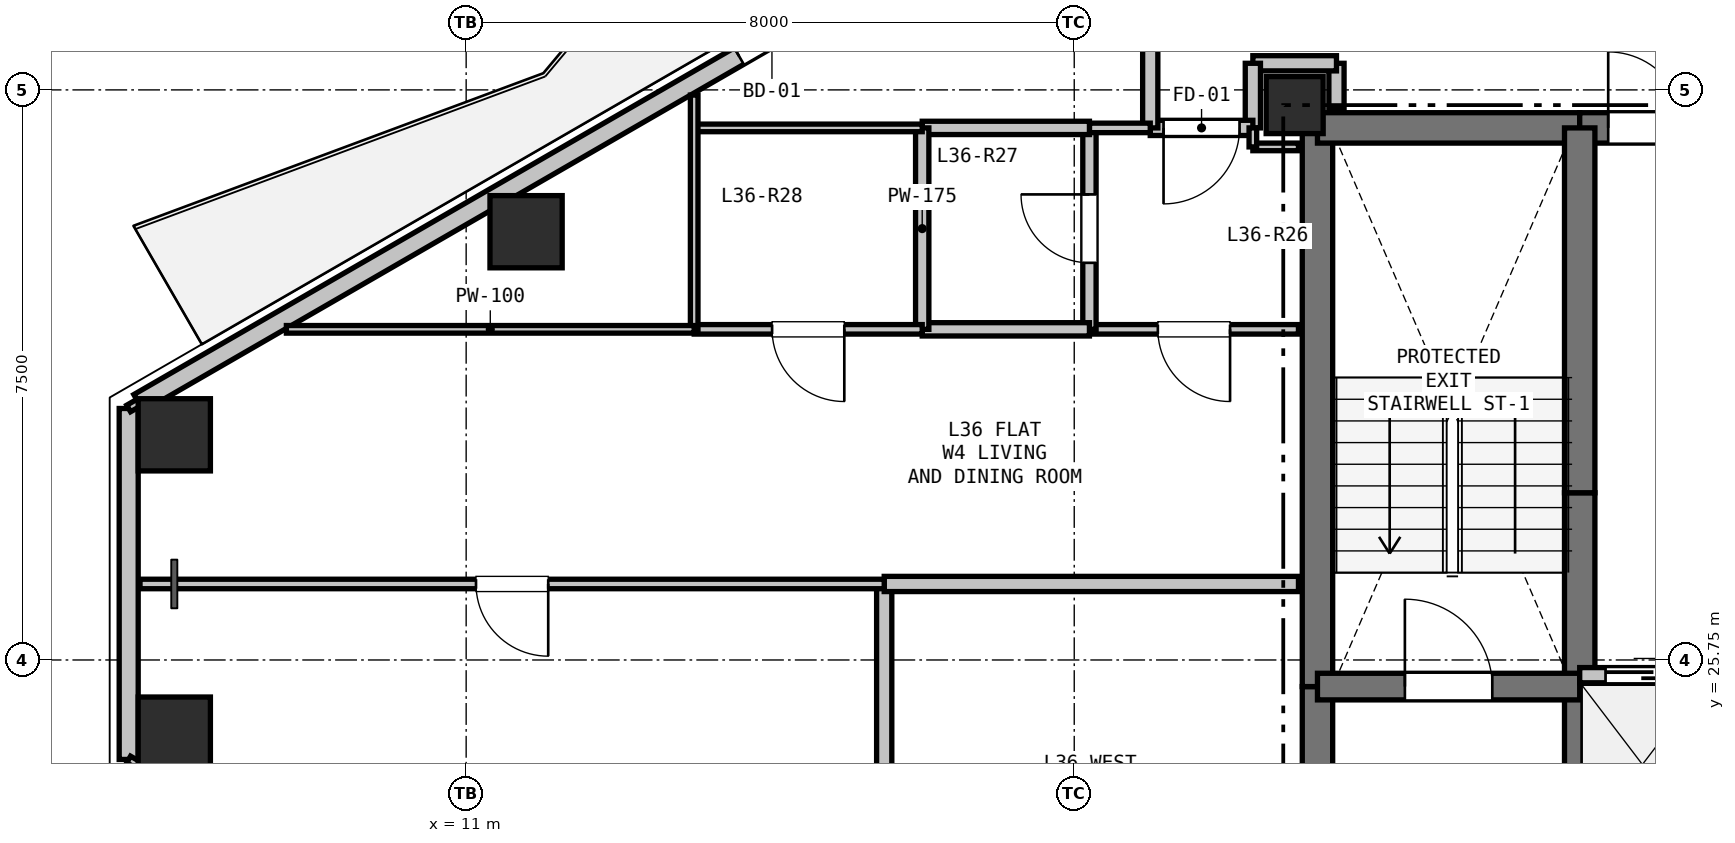
"""IFC4 building model, lengths in metres.
Left out: names, types, materials, properties, quantities, classifications, styles, units other than length and angle.
Written with IfcOpenShell. Run it as: python <this file> out.ifc"""

import sys

from ifc_helpers import new_model, si_unit, direction, frame, frame_2d, origin, origin_2d, place, context, subcontext, project, spatial, rectangle, hollow_rectangle, extrude, element, fill, save


model = new_model("IFC4")
c1 = context("Model", 3, precision=1e-05, world=origin(), true_north=direction((0.0, 1.0)))
c2 = subcontext(c1, "Body", "Model", "MODEL_VIEW")
j1 = project(units=[si_unit("LENGTHUNIT", "METRE"), si_unit("PLANEANGLEUNIT", "RADIAN")], contexts=[c1])
p1 = place(None, origin())
s1 = spatial("IfcSite", under=j1, at=p1, CompositionType="ELEMENT")
p2 = place(p1, origin())
s2 = spatial("IfcBuilding", under=s1, at=p2, CompositionType="ELEMENT")
p3 = place(p2, frame((0.0, 0.0, 131.1)))
s3 = spatial("IfcBuildingStorey", under=s2, at=p3, CompositionType="ELEMENT", Elevation=131.1)
p4 = place(p3, frame((21.9, 33.05, 0.0), z_axis=(0.0, 0.0, 1.0), x_axis=(1.0, 0.0, 0.0)))
e1 = element("IfcColumn", 1, at=p4, inside=s3, PredefinedType="COLUMN", context=c2, shape_type="SweptSolid", body=[
    extrude(rectangle(XDim=0.75, YDim=0.75, at=origin_2d()), origin(), (0.0, 0.0, 1.0), 3.3),
])
for number, where, z_axis, x_axis in (
    (2, (7.16, 28.712, 0.0), (0.0, 0.0, 1.0), (1.0, 0.0, 0.0)),
    (3, (11.788, 31.384, 0.0), (0.0, 0.0, 1.0), (1.0, 0.0, 0.0)),
    (4, (7.16, 24.788, 0.0), (0.0, 0.0, 1.0), (1.0, 0.0, 0.0)),
):
    element("IfcColumn", number, at=place(p3, frame(where, z_axis=z_axis, x_axis=x_axis)), inside=s3, PredefinedType="COLUMN", context=c2, shape_type="SweptSolid", body=[
        extrude(hollow_rectangle(XDim=0.95, YDim=0.95, WallThickness=0.028, at=origin_2d()), origin(), (0.0, 0.0, 1.0), 3.3),
    ])
p5 = place(p3, frame((6.56, 24.441, 0.0), z_axis=(0.0, 0.0, 1.0), x_axis=(0.0, 1.0, 0.0)))
e5 = element("IfcWall", 5, at=p5, inside=s3, PredefinedType="SOLIDWALL", context=c2, shape_type="SweptSolid", body=[
    extrude(rectangle(XDim=4.617, YDim=0.25, at=frame_2d((2.309, 0.0))), origin(), (0.0, 0.0, 1.0), 2.68),
])
p6 = place(p3, frame((6.69, 29.134, 0.0), z_axis=(0.0, 0.0, 1.0), x_axis=(0.866027848477, 0.499995765644, 0.0)))
e6 = element("IfcWall", 6, at=p6, inside=s3, PredefinedType="SOLIDWALL", context=c2, shape_type="SweptSolid", body=[
    extrude(rectangle(XDim=11.186, YDim=0.25, at=frame_2d((5.593, 0.0))), origin(), (0.0, 0.0, 1.0), 2.68),
])
p7 = place(p6, frame((9.122, 0.0, 0.0)))
e7 = element("IfcOpeningElement", 7, at=p7, cuts=e6, PredefinedType="OPENING", context=c2, shape_type="SweptSolid", body=[
    extrude(rectangle(XDim=1.0, YDim=2.1, at=frame_2d((0.5, 1.05))), frame((0.0, 0.135, 0.0), z_axis=(0.0, -1.0, 0.0), x_axis=(1.0, 0.0, 0.0)), (0.0, 0.0, 1.0), 0.27),
])
p8 = place(p3, frame((16.378, 18.773, 0.0), z_axis=(0.0, 0.0, 1.0), x_axis=(-0.866027848477, 0.499995765644, 0.0)))
e8 = element("IfcWall", 8, at=p8, inside=s3, PredefinedType="SOLIDWALL", context=c2, shape_type="SweptSolid", body=[
    extrude(rectangle(XDim=11.186, YDim=0.25, at=frame_2d((5.593, 0.0))), origin(), (0.0, 0.0, 1.0), 2.68),
])
p9 = place(p8, frame((6.605, 0.0, 0.9)))
e9 = element("IfcOpeningElement", 9, at=p9, cuts=e8, PredefinedType="OPENING", context=c2, shape_type="SweptSolid", body=[
    extrude(rectangle(XDim=1.2, YDim=1.4, at=frame_2d((0.6, 0.7))), frame((0.0, 0.135, 0.0), z_axis=(0.0, -1.0, 0.0), x_axis=(1.0, 0.0, 0.0)), (0.0, 0.0, 1.0), 0.27),
])
p10 = place(p3, frame((22.2, 20.75, 0.0), z_axis=(0.0, 0.0, 1.0), x_axis=(0.0, 1.0, 0.0)))
e10 = element("IfcWall", 10, at=p10, inside=s3, PredefinedType="SHEAR", context=c2, shape_type="SweptSolid", body=[
    extrude(rectangle(XDim=4.65, YDim=0.4, at=frame_2d((2.325, 0.0))), origin(), (0.0, 0.0, 1.0), 3.06),
])
p11 = place(p3, frame((22.2, 25.4, 0.0), z_axis=(0.0, 0.0, 1.0), x_axis=(0.0, 1.0, 0.0)))
e11 = element("IfcWall", 11, at=p11, inside=s3, PredefinedType="SHEAR", context=c2, shape_type="SweptSolid", body=[
    extrude(rectangle(XDim=7.35, YDim=0.4, at=frame_2d((3.675, 0.0))), origin(), (0.0, 0.0, 1.0), 3.06),
])
p12 = place(p3, frame((22.2, 32.75, 0.0), z_axis=(0.0, 0.0, 1.0), x_axis=(1.0, 0.0, 0.0)))
e12 = element("IfcWall", 12, at=p12, inside=s3, PredefinedType="SHEAR", context=c2, shape_type="SweptSolid", body=[
    extrude(rectangle(XDim=3.45, YDim=0.4, at=frame_2d((1.725, 0.0))), origin(), (0.0, 0.0, 1.0), 3.06),
])
p13 = place(p3, frame((25.65, 32.75, 0.0), z_axis=(0.0, 0.0, 1.0), x_axis=(1.0, 0.0, 0.0)))
e13 = element("IfcWall", 13, at=p13, inside=s3, PredefinedType="SHEAR", context=c2, shape_type="SweptSolid", body=[
    extrude(rectangle(XDim=1.75, YDim=0.4, at=frame_2d((0.875, 0.0))), origin(), (0.0, 0.0, 1.0), 3.06),
])
p14 = place(p13, frame((0.375, 0.0, 0.0)))
e14 = element("IfcOpeningElement", 14, at=p14, cuts=e13, PredefinedType="OPENING", context=c2, shape_type="SweptSolid", body=[
    extrude(rectangle(XDim=1.0, YDim=2.15, at=frame_2d((0.5, 1.075))), frame((0.0, 0.21, 0.0), z_axis=(0.0, -1.0, 0.0), x_axis=(1.0, 0.0, 0.0)), (0.0, 0.0, 1.0), 0.42),
])
p15 = place(p3, frame((25.65, 22.75, 0.0), z_axis=(0.0, 0.0, 1.0), x_axis=(0.0, 1.0, 0.0)))
e15 = element("IfcWall", 15, at=p15, inside=s3, PredefinedType="SHEAR", context=c2, shape_type="SweptSolid", body=[
    extrude(rectangle(XDim=2.8, YDim=0.4, at=frame_2d((1.4, 0.0))), origin(), (0.0, 0.0, 1.0), 3.06),
])
p16 = place(p3, frame((25.65, 25.55, 0.0), z_axis=(0.0, 0.0, 1.0), x_axis=(0.0, 1.0, 0.0)))
e16 = element("IfcWall", 16, at=p16, inside=s3, PredefinedType="SHEAR", context=c2, shape_type="SweptSolid", body=[
    extrude(rectangle(XDim=2.4, YDim=0.4, at=frame_2d((1.2, 0.0))), origin(), (0.0, 0.0, 1.0), 3.06),
])
p17 = place(p3, frame((25.65, 27.95, 0.0), z_axis=(0.0, 0.0, 1.0), x_axis=(0.0, 1.0, 0.0)))
e17 = element("IfcWall", 17, at=p17, inside=s3, PredefinedType="SHEAR", context=c2, shape_type="SweptSolid", body=[
    extrude(rectangle(XDim=4.8, YDim=0.4, at=frame_2d((2.4, 0.0))), origin(), (0.0, 0.0, 1.0), 3.06),
])
p18 = place(p3, frame((22.2, 25.4, 0.0), z_axis=(0.0, 0.0, 1.0), x_axis=(1.0, 0.0, 0.0)))
e18 = element("IfcWall", 18, at=p18, inside=s3, PredefinedType="SHEAR", context=c2, shape_type="SweptSolid", body=[
    extrude(rectangle(XDim=3.45, YDim=0.35, at=frame_2d((1.725, 0.0))), origin(), (0.0, 0.0, 1.0), 3.06),
])
p19 = place(p18, frame((1.15, 0.0, 0.0)))
e19 = element("IfcOpeningElement", 19, at=p19, cuts=e18, PredefinedType="OPENING", context=c2, shape_type="SweptSolid", body=[
    extrude(rectangle(XDim=1.15, YDim=2.15, at=frame_2d((0.575, 1.075))), frame((0.0, 0.185, 0.0), z_axis=(0.0, -1.0, 0.0), x_axis=(1.0, 0.0, 0.0)), (0.0, 0.0, 1.0), 0.37),
])
p20 = place(p3, frame((25.65, 25.55, 0.0), z_axis=(0.0, 0.0, 1.0), x_axis=(1.0, 0.0, 0.0)))
e20 = element("IfcWall", 20, at=p20, inside=s3, PredefinedType="PARTITIONING", context=c2, shape_type="SweptSolid", body=[
    extrude(rectangle(XDim=4.95, YDim=0.2, at=frame_2d((2.475, 0.0))), origin(), (0.0, 0.0, 1.0), 3.06),
])
p21 = place(p20, frame((0.34, 0.0, 0.0)))
e21 = element("IfcOpeningElement", 21, at=p21, cuts=e20, PredefinedType="OPENING", context=c2, shape_type="SweptSolid", body=[
    extrude(rectangle(XDim=1.1, YDim=2.15, at=frame_2d((0.55, 1.075))), frame((0.0, 0.11, 0.0), z_axis=(0.0, -1.0, 0.0), x_axis=(1.0, 0.0, 0.0)), (0.0, 0.0, 1.0), 0.22),
])
p22 = place(p20, frame((1.99, 0.0, 0.0)))
e22 = element("IfcOpeningElement", 22, at=p22, cuts=e20, PredefinedType="OPENING", context=c2, shape_type="SweptSolid", body=[
    extrude(rectangle(XDim=1.1, YDim=2.15, at=frame_2d((0.55, 1.075))), frame((0.0, 0.11, 0.0), z_axis=(0.0, -1.0, 0.0), x_axis=(1.0, 0.0, 0.0)), (0.0, 0.0, 1.0), 0.22),
])
p23 = place(p20, frame((3.64, 0.0, 0.0)))
e23 = element("IfcOpeningElement", 23, at=p23, cuts=e20, PredefinedType="OPENING", context=c2, shape_type="SweptSolid", body=[
    extrude(rectangle(XDim=1.1, YDim=2.15, at=frame_2d((0.55, 1.075))), frame((0.0, 0.11, 0.0), z_axis=(0.0, -1.0, 0.0), x_axis=(1.0, 0.0, 0.0)), (0.0, 0.0, 1.0), 0.22),
])
p24 = place(p3, frame((22.45, 33.0, 0.0), z_axis=(0.0, 0.0, 1.0), x_axis=(0.0, 1.0, 0.0)))
e24 = element("IfcWall", 24, at=p24, inside=s3, PredefinedType="PARTITIONING", context=c2, shape_type="SweptSolid", body=[
    extrude(rectangle(XDim=0.6, YDim=0.2, at=frame_2d((0.3, 0.0))), origin(), (0.0, 0.0, 1.0), 2.508),
])
p25 = place(p3, frame((22.45, 33.6, 0.0), z_axis=(0.0, 0.0, 1.0), x_axis=(-1.0, 0.0, 0.0)))
e25 = element("IfcWall", 25, at=p25, inside=s3, PredefinedType="PARTITIONING", context=c2, shape_type="SweptSolid", body=[
    extrude(rectangle(XDim=1.1, YDim=0.2, at=frame_2d((0.55, 0.0))), origin(), (0.0, 0.0, 1.0), 3.06),
])
p26 = place(p3, frame((21.35, 33.6, 0.0), z_axis=(0.0, 0.0, 1.0), x_axis=(0.0, -1.0, 0.0)))
e26 = element("IfcWall", 26, at=p26, inside=s3, PredefinedType="PARTITIONING", context=c2, shape_type="SweptSolid", body=[
    extrude(rectangle(XDim=0.85, YDim=0.2, at=frame_2d((0.425, 0.0))), origin(), (0.0, 0.0, 1.0), 2.433),
])
p27 = place(p3, frame((21.35, 32.75, 0.0), z_axis=(0.0, 0.0, 1.0), x_axis=(-1.0, 0.0, 0.0)))
e27 = element("IfcWall", 27, at=p27, inside=s3, PredefinedType="PARTITIONING", context=c2, shape_type="SweptSolid", body=[
    extrude(rectangle(XDim=1.35, YDim=0.2, at=frame_2d((0.675, 0.0))), origin(), (0.0, 0.0, 1.0), 2.433),
])
p28 = place(p27, frame((0.175, 0.0, 0.0)))
e28 = element("IfcOpeningElement", 28, at=p28, cuts=e27, PredefinedType="OPENING", context=c2, shape_type="SweptSolid", body=[
    extrude(rectangle(XDim=1.0, YDim=2.15, at=frame_2d((0.5, 1.075))), frame((0.0, 0.11, 0.0), z_axis=(0.0, -1.0, 0.0), x_axis=(1.0, 0.0, 0.0)), (0.0, 0.0, 1.0), 0.22),
])
p29 = place(p3, frame((20.0, 32.75, 0.0), z_axis=(0.0, 0.0, 1.0), x_axis=(0.0, 1.0, 0.0)))
e29 = element("IfcWall", 29, at=p29, inside=s3, PredefinedType="PARTITIONING", context=c2, shape_type="SweptSolid", body=[
    extrude(rectangle(XDim=2.6, YDim=0.2, at=frame_2d((1.3, 0.0))), origin(), (0.0, 0.0, 1.0), 2.433),
])
p30 = place(p3, frame((21.35, 32.5, 0.0), z_axis=(0.0, 0.0, 1.0), x_axis=(1.0, 0.0, 0.0)))
e30 = element("IfcWall", 30, at=p30, inside=s3, PredefinedType="PARTITIONING", context=c2, shape_type="SweptSolid", body=[
    extrude(rectangle(XDim=0.6, YDim=0.1, at=frame_2d((0.3, 0.0))), origin(), (0.0, 0.0, 1.0), 2.508),
])
p31 = place(p3, frame((21.95, 30.1, 0.0), z_axis=(0.0, 0.0, 1.0), x_axis=(-1.0, 0.0, 0.0)))
e31 = element("IfcWall", 31, at=p31, inside=s3, PredefinedType="PARTITIONING", context=c2, shape_type="SweptSolid", body=[
    extrude(rectangle(XDim=2.75, YDim=0.125, at=frame_2d((1.375, 0.0))), origin(), (0.0, 0.0, 1.0), 2.508),
])
p32 = place(p31, frame((0.9, 0.0, 0.0)))
e32 = element("IfcOpeningElement", 32, at=p32, cuts=e31, PredefinedType="OPENING", context=c2, shape_type="SweptSolid", body=[
    extrude(rectangle(XDim=0.95, YDim=2.1, at=frame_2d((0.475, 1.05))), frame((0.0, 0.073, 0.0), z_axis=(0.0, -1.0, 0.0), x_axis=(1.0, 0.0, 0.0)), (0.0, 0.0, 1.0), 0.145),
])
p33 = place(p3, frame((19.2, 30.1, 0.0), z_axis=(0.0, 0.0, 1.0), x_axis=(0.0, 1.0, 0.0)))
e33 = element("IfcWall", 33, at=p33, inside=s3, PredefinedType="PLUMBINGWALL", context=c2, shape_type="SweptSolid", body=[
    extrude(rectangle(XDim=2.65, YDim=0.175, at=frame_2d((1.325, 0.0))), origin(), (0.0, 0.0, 1.0), 2.433),
])
p34 = place(p33, frame((0.875, 0.0, 0.0)))
e34 = element("IfcOpeningElement", 34, at=p34, cuts=e33, PredefinedType="OPENING", context=c2, shape_type="SweptSolid", body=[
    extrude(rectangle(XDim=0.9, YDim=2.1, at=frame_2d((0.45, 1.05))), frame((0.0, 0.097, 0.0), z_axis=(0.0, -1.0, 0.0), x_axis=(1.0, 0.0, 0.0)), (0.0, 0.0, 1.0), 0.195),
])
p35 = place(p3, frame((19.2, 32.75, 0.0), z_axis=(0.0, 0.0, 1.0), x_axis=(1.0, 0.0, 0.0)))
e35 = element("IfcWall", 35, at=p35, inside=s3, PredefinedType="PARTITIONING", context=c2, shape_type="SweptSolid", body=[
    extrude(rectangle(XDim=0.8, YDim=0.125, at=frame_2d((0.4, 0.0))), origin(), (0.0, 0.0, 1.0), 2.433),
])
p36 = place(p3, frame((21.35, 32.75, 0.0), z_axis=(0.0, 0.0, 1.0), x_axis=(0.0, -1.0, 0.0)))
e36 = element("IfcWall", 36, at=p36, inside=s3, PredefinedType="PARTITIONING", context=c2, shape_type="SweptSolid", body=[
    extrude(rectangle(XDim=0.25, YDim=0.1, at=frame_2d((0.125, 0.0))), origin(), (0.0, 0.0, 1.0), 3.06),
])
p37 = place(p3, frame((17.0, 32.75, 0.0), z_axis=(0.0, 0.0, 1.0), x_axis=(1.0, 0.0, 0.0)))
e37 = element("IfcWall", 37, at=p37, inside=s3, PredefinedType="PLUMBINGWALL", context=c2, shape_type="SweptSolid", body=[
    extrude(rectangle(XDim=2.2, YDim=0.175, at=frame_2d((1.1, 0.0))), origin(), (0.0, 0.0, 1.0), 2.433),
])
p38 = place(p3, frame((19.2, 30.1, 0.0), z_axis=(0.0, 0.0, 1.0), x_axis=(-1.0, 0.0, 0.0)))
e38 = element("IfcWall", 38, at=p38, inside=s3, PredefinedType="PLUMBINGWALL", context=c2, shape_type="SweptSolid", body=[
    extrude(rectangle(XDim=2.2, YDim=0.175, at=frame_2d((1.1, 0.0))), origin(), (0.0, 0.0, 1.0), 3.06),
])
p39 = place(p3, frame((17.0, 30.1, 0.0), z_axis=(0.0, 0.0, 1.0), x_axis=(0.0, 1.0, 0.0)))
e39 = element("IfcWall", 39, at=p39, inside=s3, PredefinedType="PLUMBINGWALL", context=c2, shape_type="SweptSolid", body=[
    extrude(rectangle(XDim=2.65, YDim=0.175, at=frame_2d((1.325, 0.0))), origin(), (0.0, 0.0, 1.0), 2.433),
])
p40 = place(p3, frame((14.0, 32.75, 0.0), z_axis=(0.0, 0.0, 1.0), x_axis=(1.0, 0.0, 0.0)))
e40 = element("IfcWall", 40, at=p40, inside=s3, PredefinedType="PARTITIONING", context=c2, shape_type="SweptSolid", body=[
    extrude(rectangle(XDim=3.0, YDim=0.1, at=frame_2d((1.5, 0.0))), origin(), (0.0, 0.0, 1.0), 2.365),
])
p41 = place(p3, frame((17.0, 30.1, 0.0), z_axis=(0.0, 0.0, 1.0), x_axis=(-1.0, 0.0, 0.0)))
e41 = element("IfcWall", 41, at=p41, inside=s3, PredefinedType="PARTITIONING", context=c2, shape_type="SweptSolid", body=[
    extrude(rectangle(XDim=3.0, YDim=0.125, at=frame_2d((1.5, 0.0))), origin(), (0.0, 0.0, 1.0), 3.06),
])
p42 = place(p41, frame((1.025, 0.0, 0.0)))
e42 = element("IfcOpeningElement", 42, at=p42, cuts=e41, PredefinedType="OPENING", context=c2, shape_type="SweptSolid", body=[
    extrude(rectangle(XDim=0.95, YDim=2.1, at=frame_2d((0.475, 1.05))), frame((0.0, 0.073, 0.0), z_axis=(0.0, -1.0, 0.0), x_axis=(1.0, 0.0, 0.0)), (0.0, 0.0, 1.0), 0.145),
])
p43 = place(p3, frame((14.0, 30.1, 0.0), z_axis=(0.0, 0.0, 1.0), x_axis=(0.0, 1.0, 0.0)))
e43 = element("IfcWall", 43, at=p43, inside=s3, PredefinedType="PARTITIONING", context=c2, shape_type="SweptSolid", body=[
    extrude(rectangle(XDim=3.082, YDim=0.1, at=frame_2d((1.541, 0.0))), origin(), (0.0, 0.0, 1.0), 2.365),
])
p44 = place(p3, frame((16.5, 20.75, 0.0), z_axis=(0.0, 0.0, 1.0), x_axis=(0.0, 1.0, 0.0)))
e44 = element("IfcWall", 44, at=p44, inside=s3, PredefinedType="PARTITIONING", context=c2, shape_type="SweptSolid", body=[
    extrude(rectangle(XDim=6.0, YDim=0.2, at=frame_2d((3.0, 0.0))), origin(), (0.0, 0.0, 1.0), 2.433),
])
p45 = place(p3, frame((16.5, 26.75, 0.0), z_axis=(0.0, 0.0, 1.0), x_axis=(1.0, 0.0, 0.0)))
e45 = element("IfcWall", 45, at=p45, inside=s3, PredefinedType="PARTITIONING", context=c2, shape_type="SweptSolid", body=[
    extrude(rectangle(XDim=5.45, YDim=0.2, at=frame_2d((2.725, 0.0))), origin(), (0.0, 0.0, 1.0), 2.508),
])
p46 = place(p3, frame((8.635, 30.1, 0.0), z_axis=(0.0, 0.0, 1.0), x_axis=(1.0, 0.0, 0.0)))
e46 = element("IfcWall", 46, at=p46, inside=s3, PredefinedType="PARTITIONING", context=c2, shape_type="SweptSolid", body=[
    extrude(rectangle(XDim=5.365, YDim=0.1, at=frame_2d((2.683, 0.0))), origin(), (0.0, 0.0, 1.0), 2.724),
])
p47 = place(p3, frame((16.5, 26.75, 0.0), z_axis=(0.0, 0.0, 1.0), x_axis=(-1.0, 0.0, 0.0)))
e47 = element("IfcWall", 47, at=p47, inside=s3, PredefinedType="PARTITIONING", context=c2, shape_type="SweptSolid", body=[
    extrude(rectangle(XDim=9.791, YDim=0.125, at=frame_2d((4.896, 0.0))), origin(), (0.0, 0.0, 1.0), 2.724),
])
p48 = place(p47, frame((4.42, 0.0, 0.0)))
e48 = element("IfcOpeningElement", 48, at=p48, cuts=e47, PredefinedType="OPENING", context=c2, shape_type="SweptSolid", body=[
    extrude(rectangle(XDim=0.95, YDim=2.1, at=frame_2d((0.475, 1.05))), frame((0.0, 0.073, 0.0), z_axis=(0.0, -1.0, 0.0), x_axis=(1.0, 0.0, 0.0)), (0.0, 0.0, 1.0), 0.145),
])
for number, where, z_axis, x_axis in (
    (49, (6.56, 29.059, 0.0), (0.0, 0.0, 1.0), (0.866, 0.5, 0.0)),
    (50, (6.69, 24.366, 0.0), (0.0, 0.0, 1.0), (-0.866, 0.5, 0.0)),
):
    element("IfcWall", number, at=place(p3, frame(where, z_axis=z_axis, x_axis=x_axis)), inside=s3, PredefinedType="PARTITIONING", context=c2, shape_type="SweptSolid", body=[
        extrude(rectangle(XDim=0.15, YDim=0.1, at=frame_2d((0.075, 0.0))), origin(), (0.0, 0.0, 1.0), 3.06),
    ])
p49 = place(p7, origin())
e51 = element("IfcDoor", 51, at=p49, inside=s3, OperationType="SINGLE_SWING_LEFT", PredefinedType="DOOR", context=c2, shape_type="SweptSolid", body=[
    extrude(rectangle(XDim=1.0, YDim=2.1, at=frame_2d((0.5, 1.05))), frame((0.0, 0.025, 0.0), z_axis=(0.0, -1.0, 0.0), x_axis=(1.0, 0.0, 0.0)), (0.0, 0.0, 1.0), 0.05),
])
fill(e7, e51)
p50 = place(p21, origin())
e52 = element("IfcDoor", 52, at=p50, inside=s3, OperationType="SLIDING_TO_LEFT", PredefinedType="DOOR", context=c2, shape_type="SweptSolid", body=[
    extrude(rectangle(XDim=1.1, YDim=2.15, at=frame_2d((0.55, 1.075))), frame((0.0, 0.025, 0.0), z_axis=(0.0, -1.0, 0.0), x_axis=(1.0, 0.0, 0.0)), (0.0, 0.0, 1.0), 0.05),
])
fill(e21, e52)
p51 = place(p14, origin())
e53 = element("IfcDoor", 53, at=p51, inside=s3, OperationType="SINGLE_SWING_LEFT", PredefinedType="DOOR", context=c2, shape_type="SweptSolid", body=[
    extrude(rectangle(XDim=1.0, YDim=2.15, at=frame_2d((0.5, 1.075))), frame((0.0, 0.025, 0.0), z_axis=(0.0, -1.0, 0.0), x_axis=(1.0, 0.0, 0.0)), (0.0, 0.0, 1.0), 0.05),
])
fill(e14, e53)
p52 = place(p19, origin())
e54 = element("IfcDoor", 54, at=p52, inside=s3, OperationType="SINGLE_SWING_LEFT", PredefinedType="DOOR", context=c2, shape_type="SweptSolid", body=[
    extrude(rectangle(XDim=1.15, YDim=2.15, at=frame_2d((0.575, 1.075))), frame((0.0, 0.025, 0.0), z_axis=(0.0, -1.0, 0.0), x_axis=(1.0, 0.0, 0.0)), (0.0, 0.0, 1.0), 0.05),
])
fill(e19, e54)
p53 = place(p28, origin())
e55 = element("IfcDoor", 55, at=p53, inside=s3, OperationType="SINGLE_SWING_RIGHT", PredefinedType="DOOR", context=c2, shape_type="SweptSolid", body=[
    extrude(rectangle(XDim=1.0, YDim=2.15, at=frame_2d((0.5, 1.075))), frame((0.0, 0.025, 0.0), z_axis=(0.0, -1.0, 0.0), x_axis=(1.0, 0.0, 0.0)), (0.0, 0.0, 1.0), 0.05),
])
fill(e28, e55)
p54 = place(p34, origin())
e56 = element("IfcDoor", 56, at=p54, inside=s3, OperationType="SINGLE_SWING_RIGHT", PredefinedType="DOOR", context=c2, shape_type="SweptSolid", body=[
    extrude(rectangle(XDim=0.9, YDim=2.1, at=frame_2d((0.45, 1.05))), frame((0.0, 0.025, 0.0), z_axis=(0.0, -1.0, 0.0), x_axis=(1.0, 0.0, 0.0)), (0.0, 0.0, 1.0), 0.05),
])
fill(e34, e56)
p55 = place(p32, origin())
e57 = element("IfcDoor", 57, at=p55, inside=s3, OperationType="SINGLE_SWING_LEFT", PredefinedType="DOOR", context=c2, shape_type="SweptSolid", body=[
    extrude(rectangle(XDim=0.95, YDim=2.1, at=frame_2d((0.475, 1.05))), frame((0.0, 0.025, 0.0), z_axis=(0.0, -1.0, 0.0), x_axis=(1.0, 0.0, 0.0)), (0.0, 0.0, 1.0), 0.05),
])
fill(e32, e57)
p56 = place(p42, origin())
e58 = element("IfcDoor", 58, at=p56, inside=s3, OperationType="SINGLE_SWING_LEFT", PredefinedType="DOOR", context=c2, shape_type="SweptSolid", body=[
    extrude(rectangle(XDim=0.95, YDim=2.1, at=frame_2d((0.475, 1.05))), frame((0.0, 0.025, 0.0), z_axis=(0.0, -1.0, 0.0), x_axis=(1.0, 0.0, 0.0)), (0.0, 0.0, 1.0), 0.05),
])
fill(e42, e58)
p57 = place(p48, origin())
e59 = element("IfcDoor", 59, at=p57, inside=s3, OperationType="SINGLE_SWING_LEFT", PredefinedType="DOOR", context=c2, shape_type="SweptSolid", body=[
    extrude(rectangle(XDim=0.95, YDim=2.1, at=frame_2d((0.475, 1.05))), frame((0.0, 0.025, 0.0), z_axis=(0.0, -1.0, 0.0), x_axis=(1.0, 0.0, 0.0)), (0.0, 0.0, 1.0), 0.05),
])
fill(e48, e59)
save(model, sys.argv[1])
